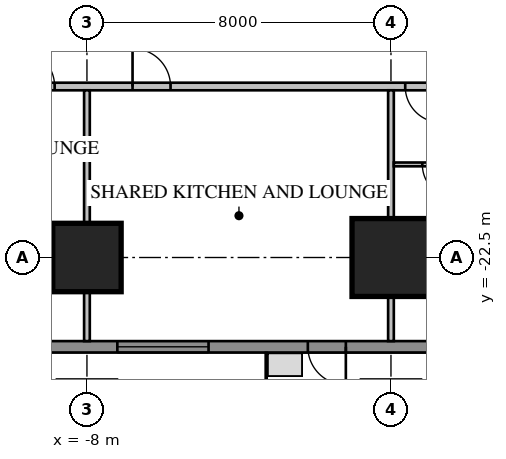
"""IFC4 building model, lengths in metres.
Left out: names, types, materials, properties, quantities, classifications, styles, units other than length and angle.
Written with IfcOpenShell. Run it as: python <this file> out.ifc"""

import sys

from ifc_helpers import new_model, si_unit, direction, frame, frame_2d, origin, origin_2d, place, context, subcontext, project, spatial, rectangle, extrude, element, fill, save


model = new_model("IFC4")
c1 = context("Model", 3, precision=1e-05, world=origin(), true_north=direction((0.0, 1.0)))
c2 = subcontext(c1, "Body", "Model", "MODEL_VIEW")
j1 = project(units=[si_unit("LENGTHUNIT", "METRE"), si_unit("PLANEANGLEUNIT", "RADIAN")], contexts=[c1])
p1 = place(None, origin())
s1 = spatial("IfcSite", under=j1, at=p1, CompositionType="ELEMENT")
p2 = place(p1, origin())
s2 = spatial("IfcBuilding", under=s1, at=p2, CompositionType="ELEMENT")
p3 = place(p2, frame((0.0, 0.0, 39.1)))
s3 = spatial("IfcBuildingStorey", under=s2, at=p3, CompositionType="ELEMENT", Elevation=39.1)
p4 = place(p3, frame((-8.0, -22.5, 0.0), z_axis=(0.0, 0.0, 1.0), x_axis=(1.0, 0.0, 0.0)))
e1 = element("IfcColumn", 1, at=p4, inside=s3, PredefinedType="COLUMN", context=c2, shape_type="SweptSolid", body=[
    extrude(rectangle(XDim=1.8, YDim=1.8, at=origin_2d()), origin(), (0.0, 0.0, 1.0), 3.85),
])
p5 = place(p3, frame((0.0, -22.5, 0.0), z_axis=(0.0, 0.0, 1.0), x_axis=(1.0, 0.0, 0.0)))
e2 = element("IfcColumn", 2, at=p5, inside=s3, PredefinedType="COLUMN", context=c2, shape_type="SweptSolid", body=[
    extrude(rectangle(XDim=2.05, YDim=2.05, at=origin_2d()), origin(), (0.0, 0.0, 1.0), 3.85),
])
p6 = place(p3, frame((-16.0, -24.85, 0.0), z_axis=(0.0, 0.0, 1.0), x_axis=(1.0, 0.0, 0.0)))
e3 = element("IfcWall", 3, at=p6, inside=s3, PredefinedType="SOLIDWALL", context=c2, shape_type="SweptSolid", body=[
    extrude(rectangle(XDim=32.0, YDim=0.3, at=frame_2d((16.0, 0.0))), origin(), (0.0, 0.0, 1.0), 3.65),
])
p7 = place(p6, frame((1.2, 0.0, 0.75)))
e4 = element("IfcOpeningElement", 4, at=p7, cuts=e3, PredefinedType="OPENING", context=c2, shape_type="SweptSolid", body=[
    extrude(rectangle(XDim=1.6, YDim=1.8, at=frame_2d((0.8, 0.9))), frame((0.0, 0.17, 0.0), z_axis=(0.0, -1.0, 0.0), x_axis=(1.0, 0.0, 0.0)), (0.0, 0.0, 1.0), 0.34),
])
p8 = place(p6, frame((5.2, 0.0, 0.75)))
e5 = element("IfcOpeningElement", 5, at=p8, cuts=e3, PredefinedType="OPENING", context=c2, shape_type="SweptSolid", body=[
    extrude(rectangle(XDim=1.6, YDim=1.8, at=frame_2d((0.8, 0.9))), frame((0.0, 0.17, 0.0), z_axis=(0.0, -1.0, 0.0), x_axis=(1.0, 0.0, 0.0)), (0.0, 0.0, 1.0), 0.34),
])
p9 = place(p6, frame((17.2, 0.0, 0.75)))
e6 = element("IfcOpeningElement", 6, at=p9, cuts=e3, PredefinedType="OPENING", context=c2, shape_type="SweptSolid", body=[
    extrude(rectangle(XDim=1.6, YDim=1.8, at=frame_2d((0.8, 0.9))), frame((0.0, 0.17, 0.0), z_axis=(0.0, -1.0, 0.0), x_axis=(1.0, 0.0, 0.0)), (0.0, 0.0, 1.0), 0.34),
])
p10 = place(p6, frame((21.2, 0.0, 0.75)))
e7 = element("IfcOpeningElement", 7, at=p10, cuts=e3, PredefinedType="OPENING", context=c2, shape_type="SweptSolid", body=[
    extrude(rectangle(XDim=1.6, YDim=1.8, at=frame_2d((0.8, 0.9))), frame((0.0, 0.17, 0.0), z_axis=(0.0, -1.0, 0.0), x_axis=(1.0, 0.0, 0.0)), (0.0, 0.0, 1.0), 0.34),
])
p11 = place(p6, frame((25.2, 0.0, 0.75)))
e8 = element("IfcOpeningElement", 8, at=p11, cuts=e3, PredefinedType="OPENING", context=c2, shape_type="SweptSolid", body=[
    extrude(rectangle(XDim=1.6, YDim=1.8, at=frame_2d((0.8, 0.9))), frame((0.0, 0.17, 0.0), z_axis=(0.0, -1.0, 0.0), x_axis=(1.0, 0.0, 0.0)), (0.0, 0.0, 1.0), 0.34),
])
p12 = place(p6, frame((29.2, 0.0, 0.75)))
e9 = element("IfcOpeningElement", 9, at=p12, cuts=e3, PredefinedType="OPENING", context=c2, shape_type="SweptSolid", body=[
    extrude(rectangle(XDim=1.6, YDim=1.8, at=frame_2d((0.8, 0.9))), frame((0.0, 0.17, 0.0), z_axis=(0.0, -1.0, 0.0), x_axis=(1.0, 0.0, 0.0)), (0.0, 0.0, 1.0), 0.34),
])
p13 = place(p6, frame((8.8, 0.0, 0.75)))
e10 = element("IfcOpeningElement", 10, at=p13, cuts=e3, PredefinedType="OPENING", context=c2, shape_type="SweptSolid", body=[
    extrude(rectangle(XDim=2.4, YDim=1.8, at=frame_2d((1.2, 0.9))), frame((0.0, 0.17, 0.0), z_axis=(0.0, -1.0, 0.0), x_axis=(1.0, 0.0, 0.0)), (0.0, 0.0, 1.0), 0.34),
])
p14 = place(p6, frame((13.812, 0.0, 0.0)))
e11 = element("IfcOpeningElement", 11, at=p14, cuts=e3, PredefinedType="OPENING", context=c2, shape_type="SweptSolid", body=[
    extrude(rectangle(XDim=1.0, YDim=2.4, at=frame_2d((0.5, 1.2))), frame((0.0, 0.17, 0.0), z_axis=(0.0, -1.0, 0.0), x_axis=(1.0, 0.0, 0.0)), (0.0, 0.0, 1.0), 0.34),
])
p15 = place(p3, frame((-18.0, -18.0, 0.0), z_axis=(0.0, 0.0, 1.0), x_axis=(1.0, 0.0, 0.0)))
e12 = element("IfcWall", 12, at=p15, inside=s3, PredefinedType="PARTITIONING", context=c2, shape_type="SweptSolid", body=[
    extrude(rectangle(XDim=36.0, YDim=0.2, at=frame_2d((18.0, 0.0))), origin(), (0.0, 0.0, 1.0), 3.65),
])
p16 = place(p15, frame((0.375, 0.0, 0.0)))
e13 = element("IfcOpeningElement", 13, at=p16, cuts=e12, PredefinedType="OPENING", context=c2, shape_type="SweptSolid", body=[
    extrude(rectangle(XDim=1.0, YDim=2.1, at=frame_2d((0.5, 1.05))), frame((0.0, 0.12, 0.0), z_axis=(0.0, -1.0, 0.0), x_axis=(1.0, 0.0, 0.0)), (0.0, 0.0, 1.0), 0.24),
])
p17 = place(p15, frame((2.45, 0.0, 0.0)))
e14 = element("IfcOpeningElement", 14, at=p17, cuts=e12, PredefinedType="OPENING", context=c2, shape_type="SweptSolid", body=[
    extrude(rectangle(XDim=0.8, YDim=2.1, at=frame_2d((0.4, 1.05))), frame((0.0, 0.12, 0.0), z_axis=(0.0, -1.0, 0.0), x_axis=(1.0, 0.0, 0.0)), (0.0, 0.0, 1.0), 0.24),
])
p18 = place(p15, frame((4.05, 0.0, 0.0)))
e15 = element("IfcOpeningElement", 15, at=p18, cuts=e12, PredefinedType="OPENING", context=c2, shape_type="SweptSolid", body=[
    extrude(rectangle(XDim=1.0, YDim=2.1, at=frame_2d((0.5, 1.05))), frame((0.0, 0.12, 0.0), z_axis=(0.0, -1.0, 0.0), x_axis=(1.0, 0.0, 0.0)), (0.0, 0.0, 1.0), 0.24),
])
p19 = place(p15, frame((6.45, 0.0, 0.0)))
e16 = element("IfcOpeningElement", 16, at=p19, cuts=e12, PredefinedType="OPENING", context=c2, shape_type="SweptSolid", body=[
    extrude(rectangle(XDim=0.9, YDim=2.1, at=frame_2d((0.45, 1.05))), frame((0.0, 0.12, 0.0), z_axis=(0.0, -1.0, 0.0), x_axis=(1.0, 0.0, 0.0)), (0.0, 0.0, 1.0), 0.24),
])
p20 = place(p15, frame((8.15, 0.0, 0.0)))
e17 = element("IfcOpeningElement", 17, at=p20, cuts=e12, PredefinedType="OPENING", context=c2, shape_type="SweptSolid", body=[
    extrude(rectangle(XDim=1.0, YDim=2.1, at=frame_2d((0.5, 1.05))), frame((0.0, 0.12, 0.0), z_axis=(0.0, -1.0, 0.0), x_axis=(1.0, 0.0, 0.0)), (0.0, 0.0, 1.0), 0.24),
])
p21 = place(p15, frame((18.375, 0.0, 0.0)))
e18 = element("IfcOpeningElement", 18, at=p21, cuts=e12, PredefinedType="OPENING", context=c2, shape_type="SweptSolid", body=[
    extrude(rectangle(XDim=0.95, YDim=2.1, at=frame_2d((0.475, 1.05))), frame((0.0, 0.12, 0.0), z_axis=(0.0, -1.0, 0.0), x_axis=(1.0, 0.0, 0.0)), (0.0, 0.0, 1.0), 0.24),
])
p22 = place(p15, frame((24.25, 0.0, 0.0)))
e19 = element("IfcOpeningElement", 19, at=p22, cuts=e12, PredefinedType="OPENING", context=c2, shape_type="SweptSolid", body=[
    extrude(rectangle(XDim=0.95, YDim=2.1, at=frame_2d((0.475, 1.05))), frame((0.0, 0.12, 0.0), z_axis=(0.0, -1.0, 0.0), x_axis=(1.0, 0.0, 0.0)), (0.0, 0.0, 1.0), 0.24),
])
p23 = place(p15, frame((26.375, 0.0, 0.0)))
e20 = element("IfcOpeningElement", 20, at=p23, cuts=e12, PredefinedType="OPENING", context=c2, shape_type="SweptSolid", body=[
    extrude(rectangle(XDim=0.95, YDim=2.1, at=frame_2d((0.475, 1.05))), frame((0.0, 0.12, 0.0), z_axis=(0.0, -1.0, 0.0), x_axis=(1.0, 0.0, 0.0)), (0.0, 0.0, 1.0), 0.24),
])
p24 = place(p15, frame((32.25, 0.0, 0.0)))
e21 = element("IfcOpeningElement", 21, at=p24, cuts=e12, PredefinedType="OPENING", context=c2, shape_type="SweptSolid", body=[
    extrude(rectangle(XDim=0.95, YDim=2.1, at=frame_2d((0.475, 1.05))), frame((0.0, 0.12, 0.0), z_axis=(0.0, -1.0, 0.0), x_axis=(1.0, 0.0, 0.0)), (0.0, 0.0, 1.0), 0.24),
])
p25 = place(p15, frame((34.375, 0.0, 0.0)))
e22 = element("IfcOpeningElement", 22, at=p25, cuts=e12, PredefinedType="OPENING", context=c2, shape_type="SweptSolid", body=[
    extrude(rectangle(XDim=0.95, YDim=2.1, at=frame_2d((0.475, 1.05))), frame((0.0, 0.12, 0.0), z_axis=(0.0, -1.0, 0.0), x_axis=(1.0, 0.0, 0.0)), (0.0, 0.0, 1.0), 0.24),
])
p26 = place(p15, frame((11.2, 0.0, 0.0)))
e23 = element("IfcOpeningElement", 23, at=p26, cuts=e12, PredefinedType="OPENING", context=c2, shape_type="SweptSolid", body=[
    extrude(rectangle(XDim=1.0, YDim=2.1, at=frame_2d((0.5, 1.05))), frame((0.0, 0.12, 0.0), z_axis=(0.0, -1.0, 0.0), x_axis=(1.0, 0.0, 0.0)), (0.0, 0.0, 1.0), 0.24),
])
p27 = place(p3, frame((-8.0, -18.1, 0.0), z_axis=(0.0, 0.0, 1.0), x_axis=(0.0, -1.0, 0.0)))
e24 = element("IfcWall", 24, at=p27, inside=s3, PredefinedType="PARTITIONING", context=c2, shape_type="SweptSolid", body=[
    extrude(rectangle(XDim=6.6, YDim=0.15, at=frame_2d((3.3, 0.0))), origin(), (0.0, 0.0, 1.0), 3.65),
])
p28 = place(p3, frame((0.0, -18.1, 0.0), z_axis=(0.0, 0.0, 1.0), x_axis=(0.0, -1.0, 0.0)))
e25 = element("IfcWall", 25, at=p28, inside=s3, PredefinedType="PARTITIONING", context=c2, shape_type="SweptSolid", body=[
    extrude(rectangle(XDim=6.6, YDim=0.15, at=frame_2d((3.3, 0.0))), origin(), (0.0, 0.0, 1.0), 2.809),
])
p29 = place(p3, frame((0.075, -20.05, 0.0), z_axis=(0.0, 0.0, 1.0), x_axis=(1.0, 0.0, 0.0)))
e26 = element("IfcWall", 26, at=p29, inside=s3, PredefinedType="PARTITIONING", context=c2, shape_type="SweptSolid", body=[
    extrude(rectangle(XDim=1.85, YDim=0.1, at=frame_2d((0.925, 0.0))), origin(), (0.0, 0.0, 1.0), 3.65),
])
p30 = place(p29, frame((0.75, 0.0, 0.0)))
e27 = element("IfcOpeningElement", 27, at=p30, cuts=e26, PredefinedType="OPENING", context=c2, shape_type="SweptSolid", body=[
    extrude(rectangle(XDim=0.9, YDim=2.1, at=frame_2d((0.45, 1.05))), frame((0.0, 0.07, 0.0), z_axis=(0.0, -1.0, 0.0), x_axis=(1.0, 0.0, 0.0)), (0.0, 0.0, 1.0), 0.14),
])
p31 = place(p13, origin())
e28 = element("IfcWindow", 28, at=p31, inside=s3, PartitioningType="SINGLE_PANEL", PredefinedType="WINDOW", context=c2, shape_type="SweptSolid", body=[
    extrude(rectangle(XDim=2.4, YDim=1.8, at=frame_2d((1.2, 0.9))), frame((0.0, 0.03, 0.0), z_axis=(0.0, -1.0, 0.0), x_axis=(1.0, 0.0, 0.0)), (0.0, 0.0, 1.0), 0.06),
])
fill(e10, e28)
p32 = place(p14, origin())
e29 = element("IfcDoor", 29, at=p32, inside=s3, OperationType="SINGLE_SWING_RIGHT", PredefinedType="DOOR", context=c2, shape_type="SweptSolid", body=[
    extrude(rectangle(XDim=1.0, YDim=2.4, at=frame_2d((0.5, 1.2))), frame((0.0, 0.025, 0.0), z_axis=(0.0, -1.0, 0.0), x_axis=(1.0, 0.0, 0.0)), (0.0, 0.0, 1.0), 0.05),
])
fill(e11, e29)
p33 = place(p20, origin())
e30 = element("IfcDoor", 30, at=p33, inside=s3, OperationType="SINGLE_SWING_LEFT", PredefinedType="DOOR", context=c2, shape_type="SweptSolid", body=[
    extrude(rectangle(XDim=1.0, YDim=2.1, at=frame_2d((0.5, 1.05))), frame((0.0, 0.025, 0.0), z_axis=(0.0, -1.0, 0.0), x_axis=(1.0, 0.0, 0.0)), (0.0, 0.0, 1.0), 0.05),
])
fill(e17, e30)
p34 = place(p21, origin())
e31 = element("IfcDoor", 31, at=p34, inside=s3, OperationType="SINGLE_SWING_RIGHT", PredefinedType="DOOR", context=c2, shape_type="SweptSolid", body=[
    extrude(rectangle(XDim=0.95, YDim=2.1, at=frame_2d((0.475, 1.05))), frame((0.0, 0.025, 0.0), z_axis=(0.0, -1.0, 0.0), x_axis=(1.0, 0.0, 0.0)), (0.0, 0.0, 1.0), 0.05),
])
fill(e18, e31)
p35 = place(p26, origin())
e32 = element("IfcDoor", 32, at=p35, inside=s3, OperationType="SINGLE_SWING_LEFT", PredefinedType="DOOR", context=c2, shape_type="SweptSolid", body=[
    extrude(rectangle(XDim=1.0, YDim=2.1, at=frame_2d((0.5, 1.05))), frame((0.0, 0.025, 0.0), z_axis=(0.0, -1.0, 0.0), x_axis=(1.0, 0.0, 0.0)), (0.0, 0.0, 1.0), 0.05),
])
fill(e23, e32)
p36 = place(p30, origin())
e33 = element("IfcDoor", 33, at=p36, inside=s3, OperationType="SINGLE_SWING_RIGHT", PredefinedType="DOOR", context=c2, shape_type="SweptSolid", body=[
    extrude(rectangle(XDim=0.9, YDim=2.1, at=frame_2d((0.45, 1.05))), frame((0.0, 0.025, 0.0), z_axis=(0.0, -1.0, 0.0), x_axis=(1.0, 0.0, 0.0)), (0.0, 0.0, 1.0), 0.05),
])
fill(e27, e33)
save(model, sys.argv[1])
